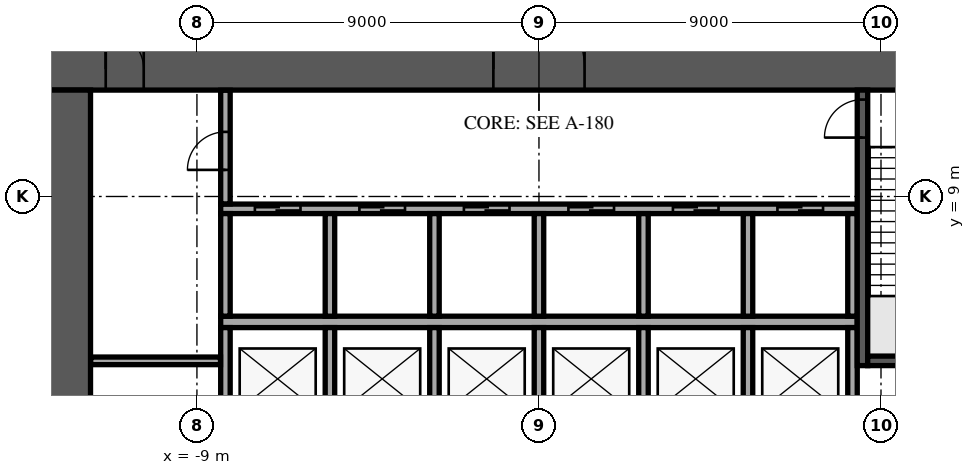
"""IFC4 building model, lengths in metres.
Left out: names, types, materials, properties, quantities, classifications, styles, units other than length and angle.
Written with IfcOpenShell. Run it as: python <this file> out.ifc"""

import sys

from ifc_helpers import new_model, si_unit, direction, frame, frame_2d, origin, place, context, subcontext, project, spatial, rectangle, extrude, element, fill, save


model = new_model("IFC4")
c1 = context("Model", 3, precision=1e-05, world=origin(), true_north=direction((0.0, 1.0)))
c2 = subcontext(c1, "Body", "Model", "MODEL_VIEW")
j1 = project(units=[si_unit("LENGTHUNIT", "METRE"), si_unit("PLANEANGLEUNIT", "RADIAN")], contexts=[c1])
p1 = place(None, origin())
s1 = spatial("IfcSite", under=j1, at=p1, CompositionType="ELEMENT")
p2 = place(p1, origin())
s2 = spatial("IfcBuilding", under=s1, at=p2, CompositionType="ELEMENT")
p3 = place(p2, frame((0.0, 0.0, 130.1)))
s3 = spatial("IfcBuildingStorey", under=s2, at=p3, CompositionType="ELEMENT", Elevation=130.1)
p4 = place(p3, frame((-12.9, 12.35, 0.0), z_axis=(0.0, 0.0, 1.0), x_axis=(1.0, 0.0, 0.0)))
e1 = element("IfcWall", 1, at=p4, inside=s3, PredefinedType="SHEAR", context=c2, shape_type="SweptSolid", body=[
    extrude(rectangle(XDim=25.8, YDim=1.1, at=frame_2d((12.9, 0.0))), origin(), (0.0, 0.0, 1.0), 5.2),
])
p5 = place(p4, frame((11.7, 0.0, 0.0)))
e2 = element("IfcOpeningElement", 2, at=p5, cuts=e1, PredefinedType="OPENING", context=c2, shape_type="SweptSolid", body=[
    extrude(rectangle(XDim=2.4, YDim=2.4, at=frame_2d((1.2, 1.2))), frame((0.0, 0.56, 0.0), z_axis=(0.0, -1.0, 0.0), x_axis=(1.0, 0.0, 0.0)), (0.0, 0.0, 1.0), 1.12),
])
p6 = place(p4, frame((22.525, 0.0, 0.0)))
e3 = element("IfcOpeningElement", 3, at=p6, cuts=e1, PredefinedType="OPENING", context=c2, shape_type="SweptSolid", body=[
    extrude(rectangle(XDim=1.2, YDim=2.1, at=frame_2d((0.6, 1.05))), frame((0.0, 0.56, 0.0), z_axis=(0.0, -1.0, 0.0), x_axis=(1.0, 0.0, 0.0)), (0.0, 0.0, 1.0), 1.12),
])
p7 = place(p4, frame((1.5, 0.0, 0.0)))
e4 = element("IfcOpeningElement", 4, at=p7, cuts=e1, PredefinedType="OPENING", context=c2, shape_type="SweptSolid", body=[
    extrude(rectangle(XDim=1.0, YDim=2.1, at=frame_2d((0.5, 1.05))), frame((0.0, 0.56, 0.0), z_axis=(0.0, -1.0, 0.0), x_axis=(1.0, 0.0, 0.0)), (0.0, 0.0, 1.0), 1.12),
])
p8 = place(p3, frame((-12.35, -11.8, 0.0), z_axis=(0.0, 0.0, 1.0), x_axis=(0.0, 1.0, 0.0)))
e5 = element("IfcWall", 5, at=p8, inside=s3, PredefinedType="SHEAR", context=c2, shape_type="SweptSolid", body=[
    extrude(rectangle(XDim=23.6, YDim=1.1, at=frame_2d((11.8, 0.0))), origin(), (0.0, 0.0, 1.0), 5.2),
])
p9 = place(p8, frame((10.6, 0.0, 0.0)))
e6 = element("IfcOpeningElement", 6, at=p9, cuts=e5, PredefinedType="OPENING", context=c2, shape_type="SweptSolid", body=[
    extrude(rectangle(XDim=2.4, YDim=2.4, at=frame_2d((1.2, 1.2))), frame((0.0, 0.56, 0.0), z_axis=(0.0, -1.0, 0.0), x_axis=(1.0, 0.0, 0.0)), (0.0, 0.0, 1.0), 1.12),
])
p10 = place(p3, frame((-8.375, 5.7, 0.0), z_axis=(0.0, 0.0, 1.0), x_axis=(1.0, 0.0, 0.0)))
e7 = element("IfcWall", 7, at=p10, inside=s3, PredefinedType="SOLIDWALL", context=c2, shape_type="SweptSolid", body=[
    extrude(rectangle(XDim=16.75, YDim=0.3, at=frame_2d((8.375, 0.0))), origin(), (0.0, 0.0, 1.0), 5.2),
])
for number, where, z_axis, x_axis in (
    (8, (-8.25, 2.85, 0.0), (0.0, 0.0, 1.0), (0.0, 1.0, 0.0)),
    (9, (-5.5, 2.85, 0.0), (0.0, 0.0, 1.0), (0.0, 1.0, 0.0)),
    (10, (-2.75, 2.85, 0.0), (0.0, 0.0, 1.0), (0.0, 1.0, 0.0)),
    (11, (0.0, 2.85, 0.0), (0.0, 0.0, 1.0), (0.0, 1.0, 0.0)),
    (12, (2.75, 2.85, 0.0), (0.0, 0.0, 1.0), (0.0, 1.0, 0.0)),
    (13, (5.5, 2.85, 0.0), (0.0, 0.0, 1.0), (0.0, 1.0, 0.0)),
    (14, (8.25, 2.85, 0.0), (0.0, 0.0, 1.0), (0.0, 1.0, 0.0)),
):
    element("IfcWall", number, at=place(p3, frame(where, z_axis=z_axis, x_axis=x_axis)), inside=s3, PredefinedType="SOLIDWALL", context=c2, shape_type="SweptSolid", body=[
        extrude(rectangle(XDim=2.7, YDim=0.25, at=frame_2d((1.35, 0.0))), origin(), (0.0, 0.0, 1.0), 5.2),
    ])
p11 = place(p3, frame((-8.375, 8.675, 0.0), z_axis=(0.0, 0.0, 1.0), x_axis=(1.0, 0.0, 0.0)))
e15 = element("IfcWall", 15, at=p11, inside=s3, PredefinedType="SOLIDWALL", context=c2, shape_type="SweptSolid", body=[
    extrude(rectangle(XDim=16.75, YDim=0.25, at=frame_2d((8.375, 0.0))), origin(), (0.0, 0.0, 1.0), 5.2),
])
p12 = place(p11, frame((0.9, 0.0, 0.0)))
e16 = element("IfcOpeningElement", 16, at=p12, cuts=e15, PredefinedType="OPENING", context=c2, shape_type="SweptSolid", body=[
    extrude(rectangle(XDim=1.2, YDim=2.1, at=frame_2d((0.6, 1.05))), frame((0.0, 0.135, 0.0), z_axis=(0.0, -1.0, 0.0), x_axis=(1.0, 0.0, 0.0)), (0.0, 0.0, 1.0), 0.27),
])
p13 = place(p11, frame((3.65, 0.0, 0.0)))
e17 = element("IfcOpeningElement", 17, at=p13, cuts=e15, PredefinedType="OPENING", context=c2, shape_type="SweptSolid", body=[
    extrude(rectangle(XDim=1.2, YDim=2.1, at=frame_2d((0.6, 1.05))), frame((0.0, 0.135, 0.0), z_axis=(0.0, -1.0, 0.0), x_axis=(1.0, 0.0, 0.0)), (0.0, 0.0, 1.0), 0.27),
])
p14 = place(p11, frame((6.4, 0.0, 0.0)))
e18 = element("IfcOpeningElement", 18, at=p14, cuts=e15, PredefinedType="OPENING", context=c2, shape_type="SweptSolid", body=[
    extrude(rectangle(XDim=1.2, YDim=2.1, at=frame_2d((0.6, 1.05))), frame((0.0, 0.135, 0.0), z_axis=(0.0, -1.0, 0.0), x_axis=(1.0, 0.0, 0.0)), (0.0, 0.0, 1.0), 0.27),
])
p15 = place(p11, frame((9.15, 0.0, 0.0)))
e19 = element("IfcOpeningElement", 19, at=p15, cuts=e15, PredefinedType="OPENING", context=c2, shape_type="SweptSolid", body=[
    extrude(rectangle(XDim=1.2, YDim=2.1, at=frame_2d((0.6, 1.05))), frame((0.0, 0.135, 0.0), z_axis=(0.0, -1.0, 0.0), x_axis=(1.0, 0.0, 0.0)), (0.0, 0.0, 1.0), 0.27),
])
p16 = place(p11, frame((11.9, 0.0, 0.0)))
e20 = element("IfcOpeningElement", 20, at=p16, cuts=e15, PredefinedType="OPENING", context=c2, shape_type="SweptSolid", body=[
    extrude(rectangle(XDim=1.2, YDim=2.1, at=frame_2d((0.6, 1.05))), frame((0.0, 0.135, 0.0), z_axis=(0.0, -1.0, 0.0), x_axis=(1.0, 0.0, 0.0)), (0.0, 0.0, 1.0), 0.27),
])
p17 = place(p11, frame((14.65, 0.0, 0.0)))
e21 = element("IfcOpeningElement", 21, at=p17, cuts=e15, PredefinedType="OPENING", context=c2, shape_type="SweptSolid", body=[
    extrude(rectangle(XDim=1.2, YDim=2.1, at=frame_2d((0.6, 1.05))), frame((0.0, 0.135, 0.0), z_axis=(0.0, -1.0, 0.0), x_axis=(1.0, 0.0, 0.0)), (0.0, 0.0, 1.0), 0.27),
])
for number, where, z_axis, x_axis in (
    (22, (-8.25, 5.85, 0.0), (0.0, 0.0, 1.0), (0.0, 1.0, 0.0)),
    (23, (-5.5, 5.85, 0.0), (0.0, 0.0, 1.0), (0.0, 1.0, 0.0)),
    (24, (-2.75, 5.85, 0.0), (0.0, 0.0, 1.0), (0.0, 1.0, 0.0)),
    (25, (0.0, 5.85, 0.0), (0.0, 0.0, 1.0), (0.0, 1.0, 0.0)),
    (26, (2.75, 5.85, 0.0), (0.0, 0.0, 1.0), (0.0, 1.0, 0.0)),
    (27, (5.5, 5.85, 0.0), (0.0, 0.0, 1.0), (0.0, 1.0, 0.0)),
    (28, (8.25, 5.85, 0.0), (0.0, 0.0, 1.0), (0.0, 1.0, 0.0)),
):
    element("IfcWall", number, at=place(p3, frame(where, z_axis=z_axis, x_axis=x_axis)), inside=s3, PredefinedType="SOLIDWALL", context=c2, shape_type="SweptSolid", body=[
        extrude(rectangle(XDim=2.7, YDim=0.25, at=frame_2d((1.35, 0.0))), origin(), (0.0, 0.0, 1.0), 5.2),
    ])
p18 = place(p3, frame((8.512, 4.55, 0.0), z_axis=(0.0, 0.0, 1.0), x_axis=(0.0, 1.0, 0.0)))
e29 = element("IfcWall", 29, at=p18, inside=s3, PredefinedType="SOLIDWALL", context=c2, shape_type="SweptSolid", body=[
    extrude(rectangle(XDim=7.25, YDim=0.275, at=frame_2d((3.625, 0.0))), origin(), (0.0, 0.0, 1.0), 5.2),
])
p19 = place(p18, frame((6.0, 0.0, 0.0)))
e30 = element("IfcOpeningElement", 30, at=p19, cuts=e29, PredefinedType="OPENING", context=c2, shape_type="SweptSolid", body=[
    extrude(rectangle(XDim=1.0, YDim=2.1, at=frame_2d((0.5, 1.05))), frame((0.0, 0.147, 0.0), z_axis=(0.0, -1.0, 0.0), x_axis=(1.0, 0.0, 0.0)), (0.0, 0.0, 1.0), 0.295),
])
p20 = place(p3, frame((8.65, 4.675, 0.0), z_axis=(0.0, 0.0, 1.0), x_axis=(1.0, 0.0, 0.0)))
e31 = element("IfcWall", 31, at=p20, inside=s3, PredefinedType="SOLIDWALL", context=c2, shape_type="SweptSolid", body=[
    extrude(rectangle(XDim=3.15, YDim=0.25, at=frame_2d((1.575, 0.0))), origin(), (0.0, 0.0, 1.0), 5.2),
])
p21 = place(p3, frame((-11.795, 4.675, 0.0), z_axis=(0.0, 0.0, 1.0), x_axis=(1.0, 0.0, 0.0)))
e32 = element("IfcWall", 32, at=p21, inside=s3, PredefinedType="PARTITIONING", context=c2, shape_type="SweptSolid", body=[
    extrude(rectangle(XDim=3.415, YDim=0.2, at=frame_2d((1.708, 0.0))), origin(), (0.0, 0.0, 1.0), 5.2),
])
p22 = place(p3, frame((-8.25, 8.805, 0.0), z_axis=(0.0, 0.0, 1.0), x_axis=(0.0, 1.0, 0.0)))
e33 = element("IfcWall", 33, at=p22, inside=s3, PredefinedType="PARTITIONING", context=c2, shape_type="SweptSolid", body=[
    extrude(rectangle(XDim=2.99, YDim=0.25, at=frame_2d((1.495, 0.0))), origin(), (0.0, 0.0, 1.0), 5.2),
])
p23 = place(p22, frame((0.895, 0.0, 0.0)))
e34 = element("IfcOpeningElement", 34, at=p23, cuts=e33, PredefinedType="OPENING", context=c2, shape_type="SweptSolid", body=[
    extrude(rectangle(XDim=1.0, YDim=2.1, at=frame_2d((0.5, 1.05))), frame((0.0, 0.135, 0.0), z_axis=(0.0, -1.0, 0.0), x_axis=(1.0, 0.0, 0.0)), (0.0, 0.0, 1.0), 0.27),
])
p24 = place(p5, origin())
e35 = element("IfcDoor", 35, at=p24, inside=s3, OperationType="SINGLE_SWING_LEFT", PredefinedType="DOOR", context=c2, shape_type="SweptSolid", body=[
    extrude(rectangle(XDim=2.4, YDim=2.4, at=frame_2d((1.2, 1.2))), frame((0.0, 0.025, 0.0), z_axis=(0.0, -1.0, 0.0), x_axis=(1.0, 0.0, 0.0)), (0.0, 0.0, 1.0), 0.05),
])
fill(e2, e35)
p25 = place(p7, origin())
e36 = element("IfcDoor", 36, at=p25, inside=s3, OperationType="SINGLE_SWING_LEFT", PredefinedType="DOOR", context=c2, shape_type="SweptSolid", body=[
    extrude(rectangle(XDim=1.0, YDim=2.1, at=frame_2d((0.5, 1.05))), frame((0.0, 0.025, 0.0), z_axis=(0.0, -1.0, 0.0), x_axis=(1.0, 0.0, 0.0)), (0.0, 0.0, 1.0), 0.05),
])
fill(e4, e36)
p26 = place(p12, origin())
e37 = element("IfcDoor", 37, at=p26, inside=s3, OperationType="DOUBLE_DOOR_SLIDING", PredefinedType="DOOR", context=c2, shape_type="SweptSolid", body=[
    extrude(rectangle(XDim=1.2, YDim=2.1, at=frame_2d((0.6, 1.05))), frame((0.0, 0.025, 0.0), z_axis=(0.0, -1.0, 0.0), x_axis=(1.0, 0.0, 0.0)), (0.0, 0.0, 1.0), 0.05),
])
fill(e16, e37)
p27 = place(p13, origin())
e38 = element("IfcDoor", 38, at=p27, inside=s3, OperationType="DOUBLE_DOOR_SLIDING", PredefinedType="DOOR", context=c2, shape_type="SweptSolid", body=[
    extrude(rectangle(XDim=1.2, YDim=2.1, at=frame_2d((0.6, 1.05))), frame((0.0, 0.025, 0.0), z_axis=(0.0, -1.0, 0.0), x_axis=(1.0, 0.0, 0.0)), (0.0, 0.0, 1.0), 0.05),
])
fill(e17, e38)
p28 = place(p14, origin())
e39 = element("IfcDoor", 39, at=p28, inside=s3, OperationType="DOUBLE_DOOR_SLIDING", PredefinedType="DOOR", context=c2, shape_type="SweptSolid", body=[
    extrude(rectangle(XDim=1.2, YDim=2.1, at=frame_2d((0.6, 1.05))), frame((0.0, 0.025, 0.0), z_axis=(0.0, -1.0, 0.0), x_axis=(1.0, 0.0, 0.0)), (0.0, 0.0, 1.0), 0.05),
])
fill(e18, e39)
p29 = place(p15, origin())
e40 = element("IfcDoor", 40, at=p29, inside=s3, OperationType="DOUBLE_DOOR_SLIDING", PredefinedType="DOOR", context=c2, shape_type="SweptSolid", body=[
    extrude(rectangle(XDim=1.2, YDim=2.1, at=frame_2d((0.6, 1.05))), frame((0.0, 0.025, 0.0), z_axis=(0.0, -1.0, 0.0), x_axis=(1.0, 0.0, 0.0)), (0.0, 0.0, 1.0), 0.05),
])
fill(e19, e40)
p30 = place(p16, origin())
e41 = element("IfcDoor", 41, at=p30, inside=s3, OperationType="DOUBLE_DOOR_SLIDING", PredefinedType="DOOR", context=c2, shape_type="SweptSolid", body=[
    extrude(rectangle(XDim=1.2, YDim=2.1, at=frame_2d((0.6, 1.05))), frame((0.0, 0.025, 0.0), z_axis=(0.0, -1.0, 0.0), x_axis=(1.0, 0.0, 0.0)), (0.0, 0.0, 1.0), 0.05),
])
fill(e20, e41)
p31 = place(p17, origin())
e42 = element("IfcDoor", 42, at=p31, inside=s3, OperationType="DOUBLE_DOOR_SLIDING", PredefinedType="DOOR", context=c2, shape_type="SweptSolid", body=[
    extrude(rectangle(XDim=1.2, YDim=2.1, at=frame_2d((0.6, 1.05))), frame((0.0, 0.025, 0.0), z_axis=(0.0, -1.0, 0.0), x_axis=(1.0, 0.0, 0.0)), (0.0, 0.0, 1.0), 0.05),
])
fill(e21, e42)
p32 = place(p19, origin())
e43 = element("IfcDoor", 43, at=p32, inside=s3, OperationType="SINGLE_SWING_LEFT", PredefinedType="DOOR", context=c2, shape_type="SweptSolid", body=[
    extrude(rectangle(XDim=1.0, YDim=2.1, at=frame_2d((0.5, 1.05))), frame((0.0, 0.025, 0.0), z_axis=(0.0, -1.0, 0.0), x_axis=(1.0, 0.0, 0.0)), (0.0, 0.0, 1.0), 0.05),
])
fill(e30, e43)
p33 = place(p23, origin())
e44 = element("IfcDoor", 44, at=p33, inside=s3, OperationType="SINGLE_SWING_LEFT", PredefinedType="DOOR", context=c2, shape_type="SweptSolid", body=[
    extrude(rectangle(XDim=1.0, YDim=2.1, at=frame_2d((0.5, 1.05))), frame((0.0, 0.025, 0.0), z_axis=(0.0, -1.0, 0.0), x_axis=(1.0, 0.0, 0.0)), (0.0, 0.0, 1.0), 0.05),
])
fill(e34, e44)
save(model, sys.argv[1])
